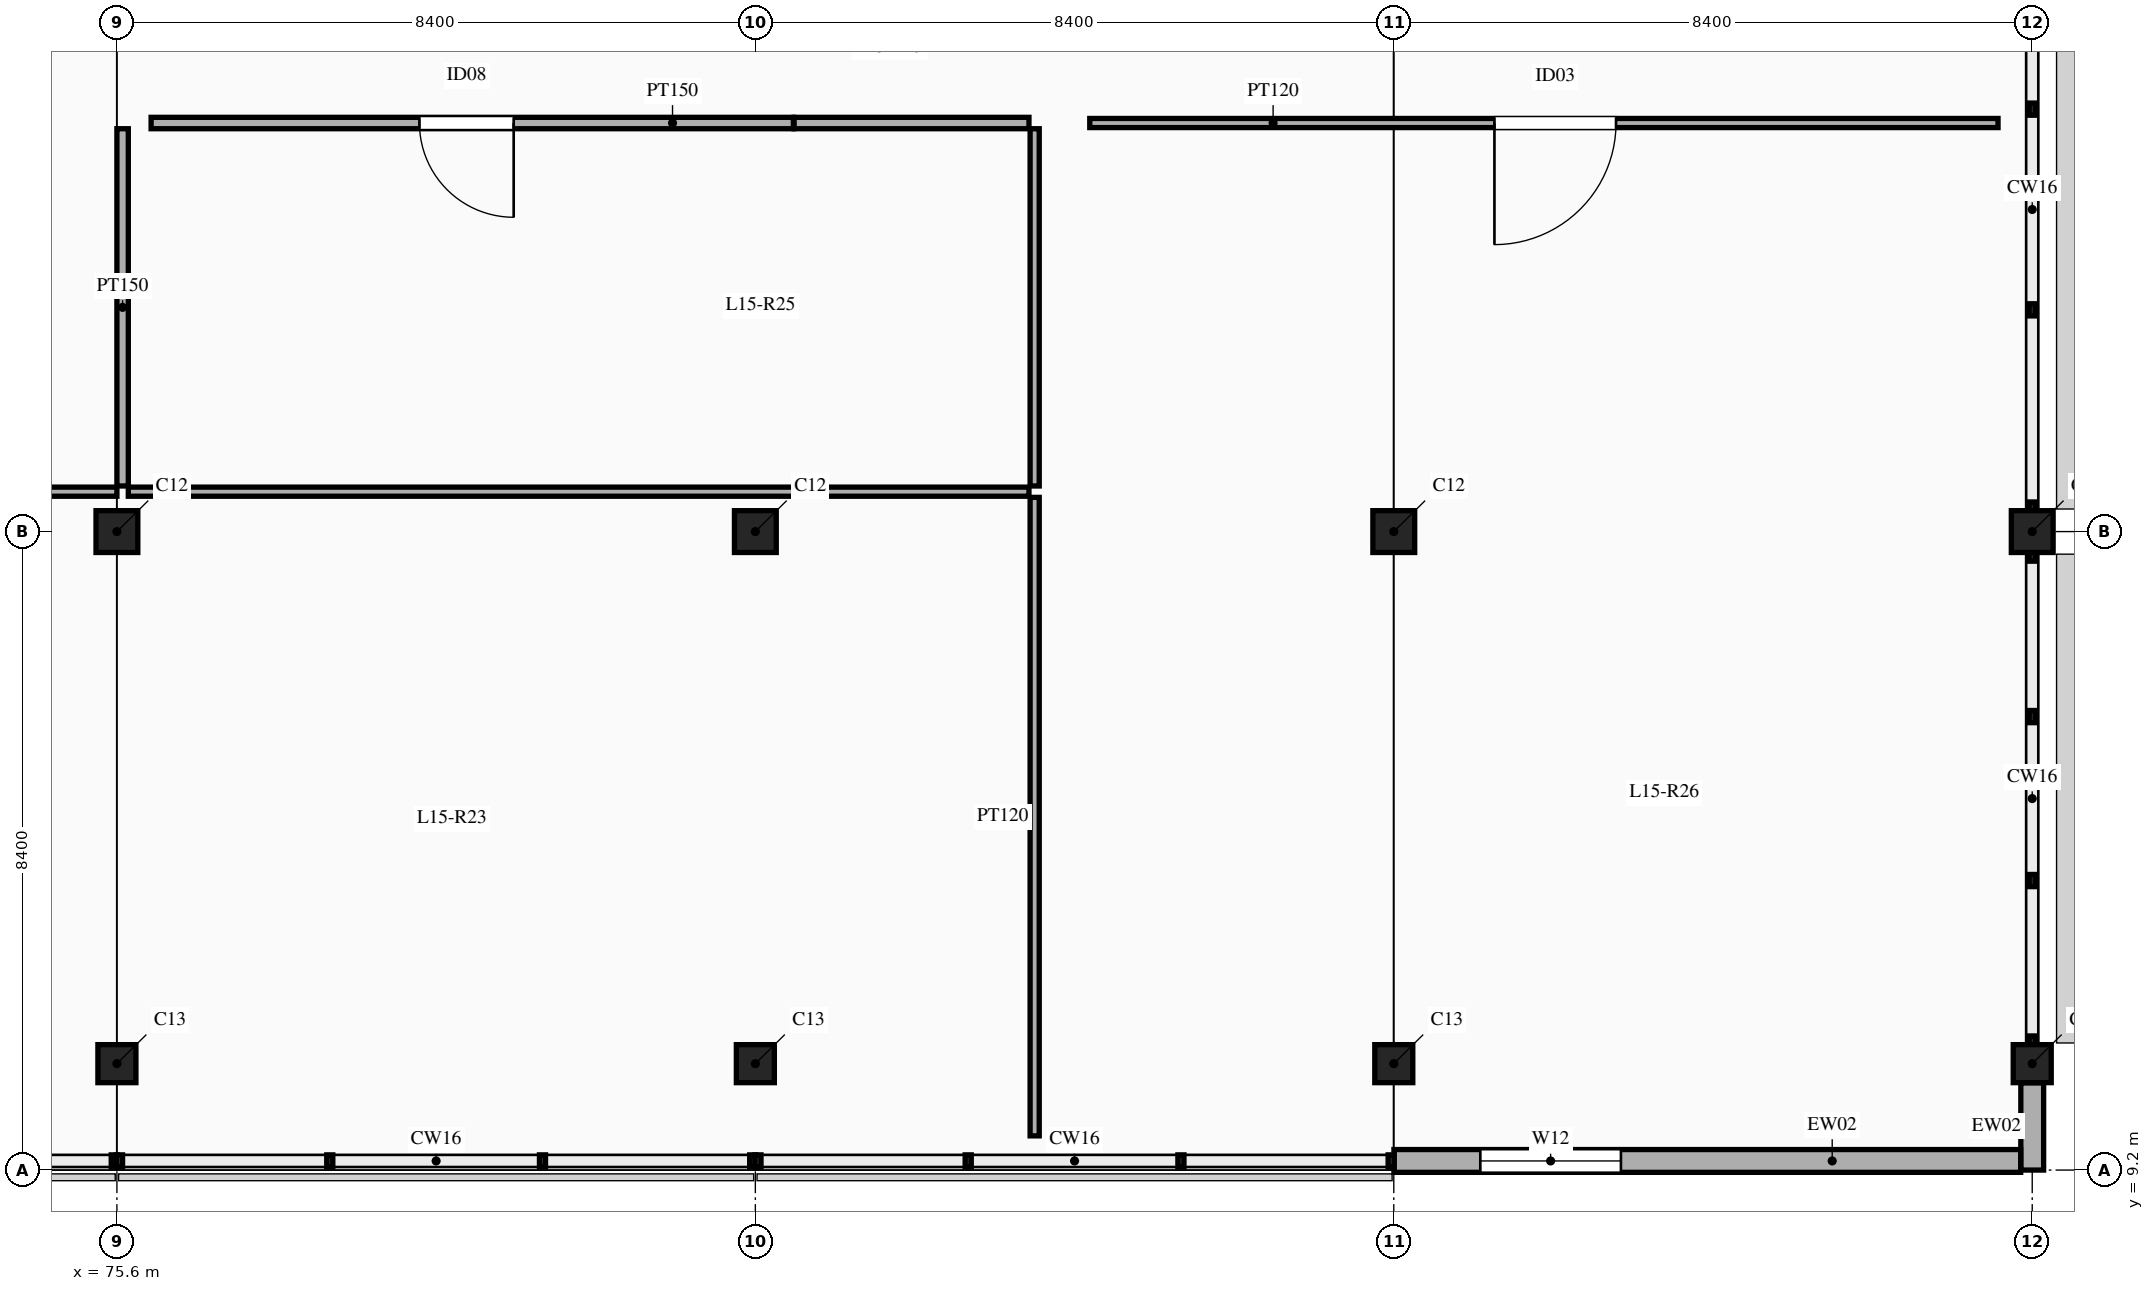
"""IFC4 building model, lengths in metres.
Left out: names, types, materials, properties, quantities, classifications, styles, units other than length and angle.
Written with IfcOpenShell. Run it as: python <this file> out.ifc"""

import sys

from ifc_helpers import new_model, si_unit, direction, frame, frame_2d, origin, origin_2d, place, context, subcontext, project, spatial, rectangle, extrude, element, fill, save


model = new_model("IFC4")
c1 = context("Model", 3, precision=1e-05, world=origin(), true_north=direction((0.0, 1.0)))
c2 = subcontext(c1, "Body", "Model", "MODEL_VIEW")
j1 = project(units=[si_unit("LENGTHUNIT", "METRE"), si_unit("PLANEANGLEUNIT", "RADIAN")], contexts=[c1])
p1 = place(None, origin())
s1 = spatial("IfcSite", under=j1, at=p1, CompositionType="ELEMENT")
p2 = place(p1, origin())
s2 = spatial("IfcBuilding", under=s1, at=p2, CompositionType="ELEMENT")
p3 = place(p2, frame((0.0, 0.0, 69.0)))
s3 = spatial("IfcBuildingStorey", under=s2, at=p3, CompositionType="ELEMENT", Elevation=69.0)
p4 = place(p3, frame((75.6, 10.6, 0.0), z_axis=(0.0, 0.0, 1.0), x_axis=(1.0, 0.0, 0.0)))
e1 = element("IfcColumn", 1, at=p4, inside=s3, PredefinedType="COLUMN", context=c2, shape_type="SweptSolid", body=[
    extrude(rectangle(XDim=0.5, YDim=0.5, at=origin_2d()), origin(), (0.0, 0.0, 1.0), 4.5),
])
p5 = place(p3, frame((75.6, 17.6, 0.0), z_axis=(0.0, 0.0, 1.0), x_axis=(1.0, 0.0, 0.0)))
e2 = element("IfcColumn", 2, at=p5, inside=s3, PredefinedType="COLUMN", context=c2, shape_type="SweptSolid", body=[
    extrude(rectangle(XDim=0.55, YDim=0.55, at=origin_2d()), origin(), (0.0, 0.0, 1.0), 4.5),
])
p6 = place(p3, frame((84.0, 10.6, 0.0), z_axis=(0.0, 0.0, 1.0), x_axis=(1.0, 0.0, 0.0)))
e3 = element("IfcColumn", 3, at=p6, inside=s3, PredefinedType="COLUMN", context=c2, shape_type="SweptSolid", body=[
    extrude(rectangle(XDim=0.5, YDim=0.5, at=origin_2d()), origin(), (0.0, 0.0, 1.0), 4.5),
])
p7 = place(p3, frame((84.0, 17.6, 0.0), z_axis=(0.0, 0.0, 1.0), x_axis=(1.0, 0.0, 0.0)))
e4 = element("IfcColumn", 4, at=p7, inside=s3, PredefinedType="COLUMN", context=c2, shape_type="SweptSolid", body=[
    extrude(rectangle(XDim=0.55, YDim=0.55, at=origin_2d()), origin(), (0.0, 0.0, 1.0), 4.5),
])
p8 = place(p3, frame((92.4, 10.6, 0.0), z_axis=(0.0, 0.0, 1.0), x_axis=(1.0, 0.0, 0.0)))
e5 = element("IfcColumn", 5, at=p8, inside=s3, PredefinedType="COLUMN", context=c2, shape_type="SweptSolid", body=[
    extrude(rectangle(XDim=0.5, YDim=0.5, at=origin_2d()), origin(), (0.0, 0.0, 1.0), 4.5),
])
p9 = place(p3, frame((92.4, 17.6, 0.0), z_axis=(0.0, 0.0, 1.0), x_axis=(1.0, 0.0, 0.0)))
e6 = element("IfcColumn", 6, at=p9, inside=s3, PredefinedType="COLUMN", context=c2, shape_type="SweptSolid", body=[
    extrude(rectangle(XDim=0.55, YDim=0.55, at=origin_2d()), origin(), (0.0, 0.0, 1.0), 4.5),
])
p10 = place(p3, frame((100.8, 10.6, 0.0), z_axis=(0.0, 0.0, 1.0), x_axis=(1.0, 0.0, 0.0)))
e7 = element("IfcColumn", 7, at=p10, inside=s3, PredefinedType="COLUMN", context=c2, shape_type="SweptSolid", body=[
    extrude(rectangle(XDim=0.5, YDim=0.5, at=origin_2d()), origin(), (0.0, 0.0, 1.0), 4.5),
])
p11 = place(p3, frame((100.8, 17.6, 0.0), z_axis=(0.0, 0.0, 1.0), x_axis=(1.0, 0.0, 0.0)))
e8 = element("IfcColumn", 8, at=p11, inside=s3, PredefinedType="COLUMN", context=c2, shape_type="SweptSolid", body=[
    extrude(rectangle(XDim=0.55, YDim=0.55, at=origin_2d()), origin(), (0.0, 0.0, 1.0), 4.5),
])
p12 = place(p3, frame((100.8, 9.2, 0.0), z_axis=(0.0, 0.0, 1.0), x_axis=(0.0, 1.0, 0.0)))
e9 = element("IfcWall", 9, at=p12, inside=s3, PredefinedType="SOLIDWALL", context=c2, shape_type="SweptSolid", body=[
    extrude(rectangle(XDim=1.148, YDim=0.3, at=frame_2d((0.574, 0.0))), origin(), (0.0, 0.0, 1.0), 3.55),
])
p13 = place(p3, frame((92.402, 9.32, 0.0), z_axis=(0.0, 0.0, 1.0), x_axis=(1.0, 0.0, 0.0)))
e10 = element("IfcWall", 10, at=p13, inside=s3, PredefinedType="SOLIDWALL", context=c2, shape_type="SweptSolid", body=[
    extrude(rectangle(XDim=8.246, YDim=0.3, at=frame_2d((4.123, 0.0))), origin(), (0.0, 0.0, 1.0), 3.55),
])
p14 = place(p13, frame((1.136, 0.0, 0.9)))
e11 = element("IfcOpeningElement", 11, at=p14, cuts=e10, PredefinedType="OPENING", context=c2, shape_type="SweptSolid", body=[
    extrude(rectangle(XDim=1.85, YDim=2.05, at=frame_2d((0.925, 1.025))), frame((0.0, 0.16, 0.0), z_axis=(0.0, -1.0, 0.0), x_axis=(1.0, 0.0, 0.0)), (0.0, 0.0, 1.0), 0.32),
])
p15 = place(p3, frame((76.05, 22.975, 0.0), z_axis=(0.0, 0.0, 1.0), x_axis=(1.0, 0.0, 0.0)))
e12 = element("IfcWall", 12, at=p15, inside=s3, PredefinedType="PARTITIONING", context=c2, shape_type="SweptSolid", body=[
    extrude(rectangle(XDim=8.45, YDim=0.15, at=frame_2d((4.225, 0.0))), origin(), (0.0, 0.0, 1.0), 3.45),
])
p16 = place(p15, frame((3.531, 0.0, 0.0)))
e13 = element("IfcOpeningElement", 13, at=p16, cuts=e12, PredefinedType="OPENING", context=c2, shape_type="SweptSolid", body=[
    extrude(rectangle(XDim=1.24, YDim=2.2, at=frame_2d((0.62, 1.1))), frame((0.0, 0.085, 0.0), z_axis=(0.0, -1.0, 0.0), x_axis=(1.0, 0.0, 0.0)), (0.0, 0.0, 1.0), 0.17),
])
p17 = place(p3, frame((84.51, 22.975, 0.0), z_axis=(0.0, 0.0, 1.0), x_axis=(1.0, 0.0, 0.0)))
e14 = element("IfcWall", 14, at=p17, inside=s3, PredefinedType="PARTITIONING", context=c2, shape_type="SweptSolid", body=[
    extrude(rectangle(XDim=3.09, YDim=0.15, at=frame_2d((1.545, 0.0))), origin(), (0.0, 0.0, 1.0), 3.45),
])
p18 = place(p3, frame((88.4, 22.975, 0.0), z_axis=(0.0, 0.0, 1.0), x_axis=(1.0, 0.0, 0.0)))
e15 = element("IfcWall", 15, at=p18, inside=s3, PredefinedType="PARTITIONING", context=c2, shape_type="SweptSolid", body=[
    extrude(rectangle(XDim=11.95, YDim=0.12, at=frame_2d((5.975, 0.0))), origin(), (0.0, 0.0, 1.0), 3.45),
])
p19 = place(p18, frame((5.324, 0.0, 0.0)))
e16 = element("IfcOpeningElement", 16, at=p19, cuts=e15, PredefinedType="OPENING", context=c2, shape_type="SweptSolid", body=[
    extrude(rectangle(XDim=1.6, YDim=2.35, at=frame_2d((0.8, 1.175))), frame((0.0, 0.07, 0.0), z_axis=(0.0, -1.0, 0.0), x_axis=(1.0, 0.0, 0.0)), (0.0, 0.0, 1.0), 0.14),
])
p20 = place(p3, frame((72.8, 18.125, 0.0), z_axis=(0.0, 0.0, 1.0), x_axis=(1.0, 0.0, 0.0)))
e17 = element("IfcWall", 17, at=p20, inside=s3, PredefinedType="PARTITIONING", context=c2, shape_type="SweptSolid", body=[
    extrude(rectangle(XDim=2.8, YDim=0.12, at=frame_2d((1.4, 0.0))), origin(), (0.0, 0.0, 1.0), 3.45),
])
p21 = place(p20, frame((0.25, 0.0, 0.0)))
e18 = element("IfcOpeningElement", 18, at=p21, cuts=e17, PredefinedType="OPENING", context=c2, shape_type="SweptSolid", body=[
    extrude(rectangle(XDim=1.6, YDim=2.35, at=frame_2d((0.8, 1.175))), frame((0.0, 0.07, 0.0), z_axis=(0.0, -1.0, 0.0), x_axis=(1.0, 0.0, 0.0)), (0.0, 0.0, 1.0), 0.14),
])
p22 = place(p3, frame((75.675, 18.2, 0.0), z_axis=(0.0, 0.0, 1.0), x_axis=(0.0, 1.0, 0.0)))
e19 = element("IfcWall", 19, at=p22, inside=s3, PredefinedType="PARTITIONING", context=c2, shape_type="SweptSolid", body=[
    extrude(rectangle(XDim=4.7, YDim=0.15, at=frame_2d((2.35, 0.0))), origin(), (0.0, 0.0, 1.0), 3.45),
])
p23 = place(p3, frame((75.75, 18.125, 0.0), z_axis=(0.0, 0.0, 1.0), x_axis=(1.0, 0.0, 0.0)))
e20 = element("IfcWall", 20, at=p23, inside=s3, PredefinedType="PARTITIONING", context=c2, shape_type="SweptSolid", body=[
    extrude(rectangle(XDim=11.85, YDim=0.12, at=frame_2d((5.925, 0.0))), origin(), (0.0, 0.0, 1.0), 3.45),
])
p24 = place(p3, frame((87.675, 9.65, 0.0), z_axis=(0.0, 0.0, 1.0), x_axis=(0.0, 1.0, 0.0)))
e21 = element("IfcWall", 21, at=p24, inside=s3, PredefinedType="PARTITIONING", context=c2, shape_type="SweptSolid", body=[
    extrude(rectangle(XDim=8.4, YDim=0.12, at=frame_2d((4.2, 0.0))), origin(), (0.0, 0.0, 1.0), 3.45),
])
p25 = place(p3, frame((87.675, 18.2, 0.0), z_axis=(0.0, 0.0, 1.0), x_axis=(0.0, 1.0, 0.0)))
e22 = element("IfcWall", 22, at=p25, inside=s3, PredefinedType="PARTITIONING", context=c2, shape_type="SweptSolid", body=[
    extrude(rectangle(XDim=4.7, YDim=0.12, at=frame_2d((2.35, 0.0))), origin(), (0.0, 0.0, 1.0), 3.45),
])
p26 = place(p14, origin())
e23 = element("IfcWindow", 23, at=p26, inside=s3, PartitioningType="DOUBLE_PANEL_HORIZONTAL", PredefinedType="WINDOW", context=c2, shape_type="SweptSolid", body=[
    extrude(rectangle(XDim=1.85, YDim=2.05, at=frame_2d((0.925, 1.025))), frame((0.0, 0.03, 0.0), z_axis=(0.0, -1.0, 0.0), x_axis=(1.0, 0.0, 0.0)), (0.0, 0.0, 1.0), 0.06),
])
fill(e11, e23)
p27 = place(p16, frame((1.24, 0.0, 0.0), z_axis=(0.0, 0.0, 1.0), x_axis=(-1.0, 0.0, 0.0)))
e24 = element("IfcDoor", 24, at=p27, inside=s3, OperationType="SINGLE_SWING_LEFT", PredefinedType="DOOR", context=c2, shape_type="SweptSolid", body=[
    extrude(rectangle(XDim=1.24, YDim=2.2, at=frame_2d((0.62, 1.1))), frame((0.0, 0.025, 0.0), z_axis=(0.0, -1.0, 0.0), x_axis=(1.0, 0.0, 0.0)), (0.0, 0.0, 1.0), 0.05),
])
fill(e13, e24)
p28 = place(p19, frame((1.6, 0.0, 0.0), z_axis=(0.0, 0.0, 1.0), x_axis=(-1.0, 0.0, 0.0)))
e25 = element("IfcDoor", 25, at=p28, inside=s3, OperationType="SINGLE_SWING_RIGHT", PredefinedType="DOOR", context=c2, shape_type="SweptSolid", body=[
    extrude(rectangle(XDim=1.6, YDim=2.35, at=frame_2d((0.8, 1.175))), frame((0.0, 0.025, 0.0), z_axis=(0.0, -1.0, 0.0), x_axis=(1.0, 0.0, 0.0)), (0.0, 0.0, 1.0), 0.05),
])
fill(e16, e25)
save(model, sys.argv[1])
